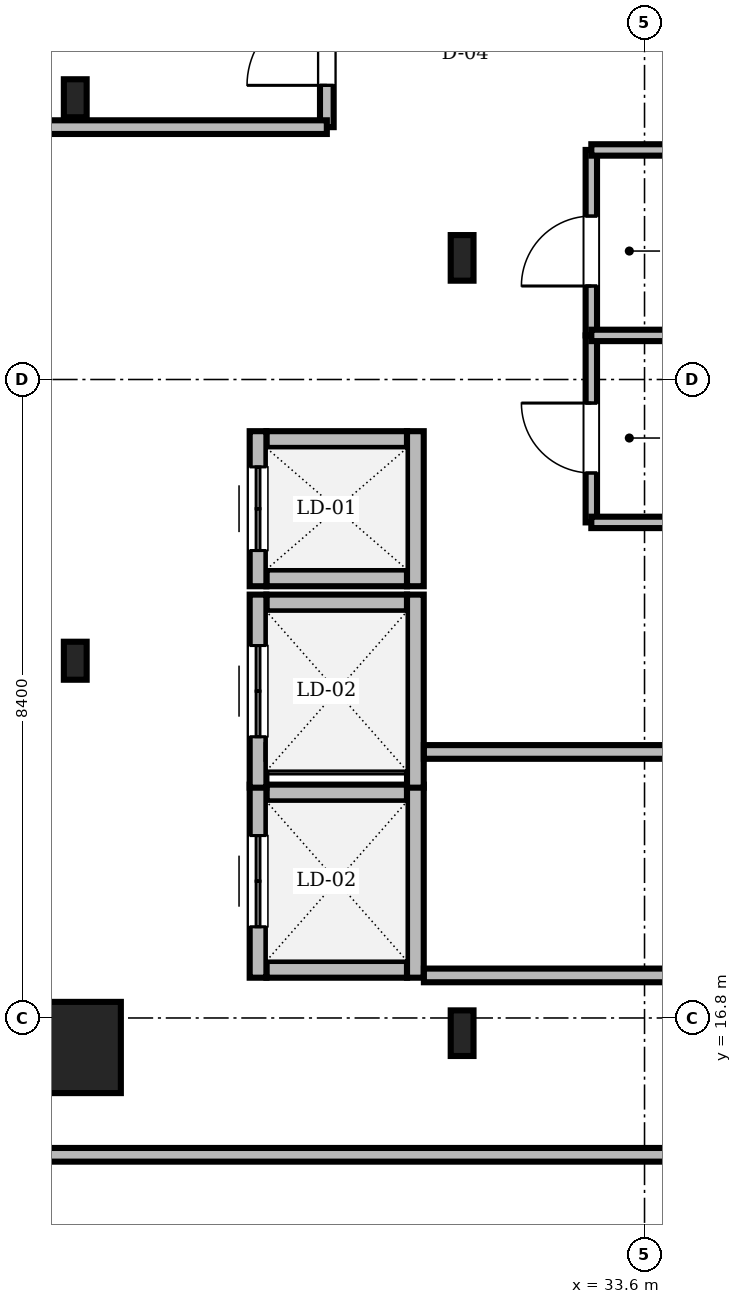
"""IFC4 building model, lengths in metres.
Left out: names, types, materials, properties, quantities, classifications, styles, units other than length and angle.
Written with IfcOpenShell. Run it as: python <this file> out.ifc"""

import sys

from ifc_helpers import new_model, si_unit, direction, frame, frame_2d, origin, origin_2d, place, context, subcontext, project, spatial, rectangle, i_section, extrude, source, transform, mapped, element, fill, save


model = new_model("IFC4")
c1 = context("Model", 3, precision=1e-05, world=origin(), true_north=direction((0.0, 1.0)))
c2 = subcontext(c1, "Body", "Model", "MODEL_VIEW")
j1 = project(units=[si_unit("LENGTHUNIT", "METRE"), si_unit("PLANEANGLEUNIT", "RADIAN")], contexts=[c1])
p1 = place(None, origin())
s1 = spatial("IfcSite", under=j1, at=p1, CompositionType="ELEMENT")
p2 = place(p1, origin())
s2 = spatial("IfcBuilding", under=s1, at=p2, CompositionType="ELEMENT")
p3 = place(p2, frame((0.0, 0.0, 291.15)))
s3 = spatial("IfcBuildingStorey", under=s2, at=p3, CompositionType="ELEMENT", Elevation=291.15)
m1 = source(origin(), c2, "Body", "SweptSolid", [
    extrude(i_section(OverallWidth=0.3, OverallDepth=0.6, WebThickness=0.015, FlangeThickness=0.03, FilletRadius=0.027, at=origin_2d()), origin(), (0.0, 0.0, 1.0), 4.7),
])
for number, where, z_axis, x_axis in (
    (1, (31.2, 16.6, 0.0), (0.0, 0.0, 1.0), (1.0, 0.0, 0.0)),
    (2, (31.2, 26.8, 0.0), (0.0, 0.0, 1.0), (1.0, 0.0, 0.0)),
):
    element("IfcColumn", number, at=place(p3, frame(where, z_axis=z_axis, x_axis=x_axis)), inside=s3, PredefinedType="COLUMN", context=c2, shape_type="MappedRepresentation", body=[
        mapped(m1, transform((0.0, 0.0, 0.0), scale=1.0)),
    ])
m2 = source(origin(), c2, "Body", "SweptSolid", [
    extrude(rectangle(XDim=1.2, YDim=1.2, at=origin_2d()), origin(), (0.0, 0.0, 1.0), 4.738),
])
p4 = place(p3, frame((26.11, 16.412, 0.0), z_axis=(0.113928451605, 0.054052892688, 0.992017435687), x_axis=(-0.428648353392, 0.903471410247, 0.0)))
e3 = element("IfcColumn", 3, at=p4, inside=s3, PredefinedType="COLUMN", context=c2, shape_type="MappedRepresentation", body=[
    mapped(m2, transform((0.0, 0.0, 0.0), scale=1.0)),
])
m3 = source(origin(), c2, "Body", "SweptSolid", [
    extrude(i_section(OverallWidth=0.3, OverallDepth=0.5, WebThickness=0.014, FlangeThickness=0.028, FilletRadius=0.027, at=origin_2d()), origin(), (0.0, 0.0, 1.0), 4.731),
])
for number, where, z_axis, x_axis in (
    (4, (26.11, 28.9, 0.0), (0.114, 0.0, 0.993), (0.0, 1.0, 0.0)),
    (5, (26.11, 21.5, 0.0), (0.114, 0.0, 0.993), (0.0, 1.0, 0.0)),
):
    element("IfcColumn", number, at=place(p3, frame(where, z_axis=z_axis, x_axis=x_axis)), inside=s3, PredefinedType="COLUMN", context=c2, shape_type="MappedRepresentation", body=[
        mapped(m3, transform((0.0, 0.0, 0.0), scale=1.0)),
    ])
m4 = source(origin(), c2, "Body", "SweptSolid", [
    extrude(rectangle(XDim=1.85, YDim=0.22, at=frame_2d((0.925, 0.0))), origin(), (0.0, 0.0, 1.0), 4.7),
])
for number, where, z_axis, x_axis in (
    (6, (28.625, 17.44, 0.0), (0.0, 0.0, 1.0), (1.0, 0.0, 0.0)),
    (7, (28.625, 19.76, 0.0), (0.0, 0.0, 1.0), (1.0, 0.0, 0.0)),
):
    element("IfcWall", number, at=place(p3, frame(where, z_axis=z_axis, x_axis=x_axis)), inside=s3, PredefinedType="SOLIDWALL", context=c2, shape_type="MappedRepresentation", body=[
        mapped(m4, transform((0.0, 0.0, 0.0), scale=1.0)),
    ])
m5 = source(origin(), c2, "Body", "SweptSolid", [
    extrude(rectangle(XDim=2.54, YDim=0.22, at=frame_2d((1.27, 0.0))), origin(), (0.0, 0.0, 1.0), 4.7),
])
p5 = place(p3, frame((28.515, 17.33, 0.0), z_axis=(0.0, 0.0, 1.0), x_axis=(0.0, 1.0, 0.0)))
e8 = element("IfcWall", 8, at=p5, inside=s3, PredefinedType="SOLIDWALL", context=c2, shape_type="MappedRepresentation", body=[
    mapped(m5, transform((0.0, 0.0, 0.0), scale=1.0)),
])
m6 = source(origin(), c2, "Body", "SweptSolid", [
    extrude(rectangle(XDim=1.2, YDim=2.25, at=frame_2d((0.6, 1.125))), frame((0.0, 0.12, 0.0), z_axis=(0.0, -1.0, 0.0), x_axis=(1.0, 0.0, 0.0)), (0.0, 0.0, 1.0), 0.24),
])
p6 = place(p5, frame((0.67, 0.0, 0.0)))
e9 = element("IfcOpeningElement", 9, at=p6, cuts=e8, PredefinedType="OPENING", context=c2, shape_type="MappedRepresentation", body=[
    mapped(m6, transform((0.0, 0.0, 0.0), scale=1.0)),
])
p7 = place(p3, frame((30.585, 17.33, 0.0), z_axis=(0.0, 0.0, 1.0), x_axis=(0.0, 1.0, 0.0)))
e10 = element("IfcWall", 10, at=p7, inside=s3, PredefinedType="SOLIDWALL", context=c2, shape_type="MappedRepresentation", body=[
    mapped(m5, transform((0.0, 0.0, 0.0), scale=1.0)),
])
p8 = place(p3, frame((28.625, 22.26, 0.0), z_axis=(0.0, 0.0, 1.0), x_axis=(1.0, 0.0, 0.0)))
e11 = element("IfcWall", 11, at=p8, inside=s3, PredefinedType="SOLIDWALL", context=c2, shape_type="MappedRepresentation", body=[
    mapped(m4, transform((0.0, 0.0, 0.0), scale=1.0)),
])
p9 = place(p3, frame((28.515, 19.83, 0.0), z_axis=(0.0, 0.0, 1.0), x_axis=(0.0, 1.0, 0.0)))
e12 = element("IfcWall", 12, at=p9, inside=s3, PredefinedType="SOLIDWALL", context=c2, shape_type="MappedRepresentation", body=[
    mapped(m5, transform((0.0, 0.0, 0.0), scale=1.0)),
])
p10 = place(p9, frame((0.67, 0.0, 0.0)))
e13 = element("IfcOpeningElement", 13, at=p10, cuts=e12, PredefinedType="OPENING", context=c2, shape_type="MappedRepresentation", body=[
    mapped(m6, transform((0.0, 0.0, 0.0), scale=1.0)),
])
p11 = place(p3, frame((30.585, 19.83, 0.0), z_axis=(0.0, 0.0, 1.0), x_axis=(0.0, 1.0, 0.0)))
e14 = element("IfcWall", 14, at=p11, inside=s3, PredefinedType="SOLIDWALL", context=c2, shape_type="MappedRepresentation", body=[
    mapped(m5, transform((0.0, 0.0, 0.0), scale=1.0)),
])
for number, where, z_axis, x_axis in (
    (15, (28.625, 22.59, 0.0), (0.0, 0.0, 1.0), (1.0, 0.0, 0.0)),
    (16, (28.625, 24.41, 0.0), (0.0, 0.0, 1.0), (1.0, 0.0, 0.0)),
):
    element("IfcWall", number, at=place(p3, frame(where, z_axis=z_axis, x_axis=x_axis)), inside=s3, PredefinedType="SOLIDWALL", context=c2, shape_type="MappedRepresentation", body=[
        mapped(m4, transform((0.0, 0.0, 0.0), scale=1.0)),
    ])
m7 = source(origin(), c2, "Body", "SweptSolid", [
    extrude(rectangle(XDim=2.04, YDim=0.22, at=frame_2d((1.02, 0.0))), origin(), (0.0, 0.0, 1.0), 4.7),
])
p12 = place(p3, frame((28.515, 22.48, 0.0), z_axis=(0.0, 0.0, 1.0), x_axis=(0.0, 1.0, 0.0)))
e17 = element("IfcWall", 17, at=p12, inside=s3, PredefinedType="SOLIDWALL", context=c2, shape_type="MappedRepresentation", body=[
    mapped(m7, transform((0.0, 0.0, 0.0), scale=1.0)),
])
m8 = source(origin(), c2, "Body", "SweptSolid", [
    extrude(rectangle(XDim=1.1, YDim=2.2, at=frame_2d((0.55, 1.1))), frame((0.0, 0.12, 0.0), z_axis=(0.0, -1.0, 0.0), x_axis=(1.0, 0.0, 0.0)), (0.0, 0.0, 1.0), 0.24),
])
p13 = place(p12, frame((0.47, 0.0, 0.0)))
e18 = element("IfcOpeningElement", 18, at=p13, cuts=e17, PredefinedType="OPENING", context=c2, shape_type="MappedRepresentation", body=[
    mapped(m8, transform((0.0, 0.0, 0.0), scale=1.0)),
])
p14 = place(p3, frame((30.585, 22.48, 0.0), z_axis=(0.0, 0.0, 1.0), x_axis=(0.0, 1.0, 0.0)))
e19 = element("IfcWall", 19, at=p14, inside=s3, PredefinedType="SOLIDWALL", context=c2, shape_type="MappedRepresentation", body=[
    mapped(m7, transform((0.0, 0.0, 0.0), scale=1.0)),
])
m9 = source(origin(), c2, "Body", "SweptSolid", [
    extrude(rectangle(XDim=25.018, YDim=0.18, at=frame_2d((12.509, 0.0))), origin(), (0.0, 0.0, 1.0), 3.942),
])
p15 = place(p3, frame((25.282, 15.0, 0.0), z_axis=(0.0, 0.0, 1.0), x_axis=(1.0, 0.0, 0.0)))
e20 = element("IfcWall", 20, at=p15, inside=s3, PredefinedType="PARTITIONING", context=c2, shape_type="MappedRepresentation", body=[
    mapped(m9, transform((0.0, 0.0, 0.0), scale=1.0)),
])
m10 = source(origin(), c2, "Body", "SweptSolid", [
    extrude(rectangle(XDim=1.05, YDim=2.2, at=frame_2d((0.525, 1.1))), frame((0.0, 0.1, 0.0), z_axis=(0.0, -1.0, 0.0), x_axis=(1.0, 0.0, 0.0)), (0.0, 0.0, 1.0), 0.2),
])
p16 = place(p15, frame((8.603, 0.0, 0.0)))
e21 = element("IfcOpeningElement", 21, at=p16, cuts=e20, PredefinedType="OPENING", context=c2, shape_type="MappedRepresentation", body=[
    mapped(m10, transform((0.0, 0.0, 0.0), scale=1.0)),
])
p17 = place(p15, frame((23.768, 0.0, 0.0)))
e22 = element("IfcOpeningElement", 22, at=p17, cuts=e20, PredefinedType="OPENING", context=c2, shape_type="MappedRepresentation", body=[
    mapped(m10, transform((0.0, 0.0, 0.0), scale=1.0)),
])
m11 = source(origin(), c2, "Body", "SweptSolid", [
    extrude(rectangle(XDim=2.13, YDim=0.18, at=frame_2d((1.065, 0.0))), origin(), (0.0, 0.0, 1.0), 4.332),
])
p18 = place(p3, frame((29.42, 28.52, 0.0), z_axis=(0.0, 0.0, 1.0), x_axis=(0.0, 1.0, 0.0)))
e23 = element("IfcWall", 23, at=p18, inside=s3, PredefinedType="PARTITIONING", context=c2, shape_type="MappedRepresentation", body=[
    mapped(m11, transform((0.0, 0.0, 0.0), scale=1.0)),
])
p19 = place(p18, frame((0.55, 0.0, 0.0)))
e24 = element("IfcOpeningElement", 24, at=p19, cuts=e23, PredefinedType="OPENING", context=c2, shape_type="MappedRepresentation", body=[
    mapped(m10, transform((0.0, 0.0, 0.0), scale=1.0)),
])
m12 = source(origin(), c2, "Body", "SweptSolid", [
    extrude(rectangle(XDim=10.803, YDim=0.18, at=frame_2d((5.401, 0.0))), origin(), (0.0, 0.0, 1.0), 4.242),
])
p20 = place(p3, frame((30.697, 17.36, 0.0), z_axis=(0.0, 0.0, 1.0), x_axis=(1.0, 0.0, 0.0)))
e25 = element("IfcWall", 25, at=p20, inside=s3, PredefinedType="PARTITIONING", context=c2, shape_type="MappedRepresentation", body=[
    mapped(m12, transform((0.0, 0.0, 0.0), scale=1.0)),
])
p21 = place(p20, frame((3.253, 0.0, 0.0)))
e26 = element("IfcOpeningElement", 26, at=p21, cuts=e25, PredefinedType="OPENING", context=c2, shape_type="MappedRepresentation", body=[
    mapped(m10, transform((0.0, 0.0, 0.0), scale=1.0)),
])
m13 = source(origin(), c2, "Body", "SweptSolid", [
    extrude(rectangle(XDim=2.46, YDim=0.15, at=frame_2d((1.23, 0.0))), origin(), (0.0, 0.0, 1.0), 4.7),
])
p22 = place(p3, frame((32.9, 23.32, 0.0), z_axis=(0.0, 0.0, 1.0), x_axis=(0.0, 1.0, 0.0)))
e27 = element("IfcWall", 27, at=p22, inside=s3, PredefinedType="PARTITIONING", context=c2, shape_type="MappedRepresentation", body=[
    mapped(m13, transform((0.0, 0.0, 0.0), scale=1.0)),
])
m14 = source(origin(), c2, "Body", "SweptSolid", [
    extrude(rectangle(XDim=0.92, YDim=2.1, at=frame_2d((0.46, 1.05))), frame((0.0, 0.085, 0.0), z_axis=(0.0, -1.0, 0.0), x_axis=(1.0, 0.0, 0.0)), (0.0, 0.0, 1.0), 0.17),
])
p23 = place(p22, frame((0.65, 0.0, 0.0)))
e28 = element("IfcOpeningElement", 28, at=p23, cuts=e27, PredefinedType="OPENING", context=c2, shape_type="MappedRepresentation", body=[
    mapped(m14, transform((0.0, 0.0, 0.0), scale=1.0)),
])
m15 = source(origin(), c2, "Body", "SweptSolid", [
    extrude(rectangle(XDim=2.44, YDim=0.15, at=frame_2d((1.22, 0.0))), origin(), (0.0, 0.0, 1.0), 4.242),
])
p24 = place(p3, frame((32.9, 25.78, 0.0), z_axis=(0.0, 0.0, 1.0), x_axis=(0.0, 1.0, 0.0)))
e29 = element("IfcWall", 29, at=p24, inside=s3, PredefinedType="PARTITIONING", context=c2, shape_type="MappedRepresentation", body=[
    mapped(m15, transform((0.0, 0.0, 0.0), scale=1.0)),
])
p25 = place(p24, frame((0.65, 0.0, 0.0)))
e30 = element("IfcOpeningElement", 30, at=p25, cuts=e29, PredefinedType="OPENING", context=c2, shape_type="MappedRepresentation", body=[
    mapped(m14, transform((0.0, 0.0, 0.0), scale=1.0)),
])
m16 = source(origin(), c2, "Body", "SweptSolid", [
    extrude(rectangle(XDim=1.846, YDim=0.18, at=frame_2d((0.923, 0.0))), origin(), (0.0, 0.0, 1.0), 4.7),
])
p26 = place(p3, frame((28.627, 20.3, 0.0), z_axis=(0.0, 0.0, 1.0), x_axis=(1.0, 0.0, 0.0)))
e31 = element("IfcWall", 31, at=p26, inside=s3, PredefinedType="PARTITIONING", context=c2, shape_type="MappedRepresentation", body=[
    mapped(m16, transform((0.0, 0.0, 0.0), scale=1.0)),
])
p27 = place(p3, frame((30.697, 20.3, 0.0), z_axis=(0.0, 0.0, 1.0), x_axis=(1.0, 0.0, 0.0)))
e32 = element("IfcWall", 32, at=p27, inside=s3, PredefinedType="PARTITIONING", context=c2, shape_type="MappedRepresentation", body=[
    mapped(m12, transform((0.0, 0.0, 0.0), scale=1.0)),
])
m17 = source(origin(), c2, "Body", "SweptSolid", [
    extrude(rectangle(XDim=4.138, YDim=0.18, at=frame_2d((2.069, 0.0))), origin(), (0.0, 0.0, 1.0), 3.942),
])
p28 = place(p3, frame((25.282, 28.52, 0.0), z_axis=(0.0, 0.0, 1.0), x_axis=(1.0, 0.0, 0.0)))
e33 = element("IfcWall", 33, at=p28, inside=s3, PredefinedType="PARTITIONING", context=c2, shape_type="MappedRepresentation", body=[
    mapped(m17, transform((0.0, 0.0, 0.0), scale=1.0)),
])
m18 = source(origin(), c2, "Body", "SweptSolid", [
    extrude(rectangle(XDim=2.06, YDim=0.15, at=frame_2d((1.03, 0.0))), origin(), (0.0, 0.0, 1.0), 4.7),
])
p29 = place(p3, frame((32.9, 25.78, 0.0), z_axis=(0.0, 0.0, 1.0), x_axis=(1.0, 0.0, 0.0)))
e34 = element("IfcWall", 34, at=p29, inside=s3, PredefinedType="PARTITIONING", context=c2, shape_type="MappedRepresentation", body=[
    mapped(m18, transform((0.0, 0.0, 0.0), scale=1.0)),
])
m19 = source(origin(), c2, "Body", "SweptSolid", [
    extrude(rectangle(XDim=2.06, YDim=0.15, at=frame_2d((1.03, 0.0))), origin(), (0.0, 0.0, 1.0), 4.332),
])
p30 = place(p3, frame((32.9, 28.22, 0.0), z_axis=(0.0, 0.0, 1.0), x_axis=(1.0, 0.0, 0.0)))
e35 = element("IfcWall", 35, at=p30, inside=s3, PredefinedType="PARTITIONING", context=c2, shape_type="MappedRepresentation", body=[
    mapped(m19, transform((0.0, 0.0, 0.0), scale=1.0)),
])
p31 = place(p3, frame((32.9, 23.32, 0.0), z_axis=(0.0, 0.0, 1.0), x_axis=(1.0, 0.0, 0.0)))
e36 = element("IfcWall", 36, at=p31, inside=s3, PredefinedType="PARTITIONING", context=c2, shape_type="MappedRepresentation", body=[
    mapped(m18, transform((0.0, 0.0, 0.0), scale=1.0)),
])
m20 = source(origin(), c2, "Body", "SweptSolid", [
    extrude(rectangle(XDim=1.2, YDim=2.25, at=frame_2d((0.6, 1.125))), frame((0.0, 0.025, 0.0), z_axis=(0.0, -1.0, 0.0), x_axis=(1.0, 0.0, 0.0)), (0.0, 0.0, 1.0), 0.05),
])
p32 = place(p6, origin())
e37 = element("IfcDoor", 37, at=p32, inside=s3, OperationType="DOUBLE_DOOR_SLIDING", PredefinedType="DOOR", context=c2, shape_type="MappedRepresentation", body=[
    mapped(m20, transform((0.0, 0.0, 0.0), scale=1.0)),
])
fill(e9, e37)
p33 = place(p10, origin())
e38 = element("IfcDoor", 38, at=p33, inside=s3, OperationType="DOUBLE_DOOR_SLIDING", PredefinedType="DOOR", context=c2, shape_type="MappedRepresentation", body=[
    mapped(m20, transform((0.0, 0.0, 0.0), scale=1.0)),
])
fill(e13, e38)
m21 = source(origin(), c2, "Body", "SweptSolid", [
    extrude(rectangle(XDim=1.1, YDim=2.2, at=frame_2d((0.55, 1.1))), frame((0.0, 0.025, 0.0), z_axis=(0.0, -1.0, 0.0), x_axis=(1.0, 0.0, 0.0)), (0.0, 0.0, 1.0), 0.05),
])
p34 = place(p13, origin())
e39 = element("IfcDoor", 39, at=p34, inside=s3, OperationType="DOUBLE_DOOR_SLIDING", PredefinedType="DOOR", context=c2, shape_type="MappedRepresentation", body=[
    mapped(m21, transform((0.0, 0.0, 0.0), scale=1.0)),
])
fill(e18, e39)
m22 = source(origin(), c2, "Body", "SweptSolid", [
    extrude(rectangle(XDim=1.05, YDim=2.2, at=frame_2d((0.525, 1.1))), frame((0.0, 0.025, 0.0), z_axis=(0.0, -1.0, 0.0), x_axis=(1.0, 0.0, 0.0)), (0.0, 0.0, 1.0), 0.05),
])
p35 = place(p19, origin())
e40 = element("IfcDoor", 40, at=p35, inside=s3, OperationType="SINGLE_SWING_LEFT", PredefinedType="DOOR", context=c2, shape_type="MappedRepresentation", body=[
    mapped(m22, transform((0.0, 0.0, 0.0), scale=1.0)),
])
fill(e24, e40)
m23 = source(origin(), c2, "Body", "SweptSolid", [
    extrude(rectangle(XDim=0.92, YDim=2.1, at=frame_2d((0.46, 1.05))), frame((0.0, 0.025, 0.0), z_axis=(0.0, -1.0, 0.0), x_axis=(1.0, 0.0, 0.0)), (0.0, 0.0, 1.0), 0.05),
])
p36 = place(p23, origin())
e41 = element("IfcDoor", 41, at=p36, inside=s3, OperationType="SINGLE_SWING_RIGHT", PredefinedType="DOOR", context=c2, shape_type="MappedRepresentation", body=[
    mapped(m23, transform((0.0, 0.0, 0.0), scale=1.0)),
])
fill(e28, e41)
p37 = place(p25, origin())
e42 = element("IfcDoor", 42, at=p37, inside=s3, OperationType="SINGLE_SWING_LEFT", PredefinedType="DOOR", context=c2, shape_type="MappedRepresentation", body=[
    mapped(m23, transform((0.0, 0.0, 0.0), scale=1.0)),
])
fill(e30, e42)
save(model, sys.argv[1])
